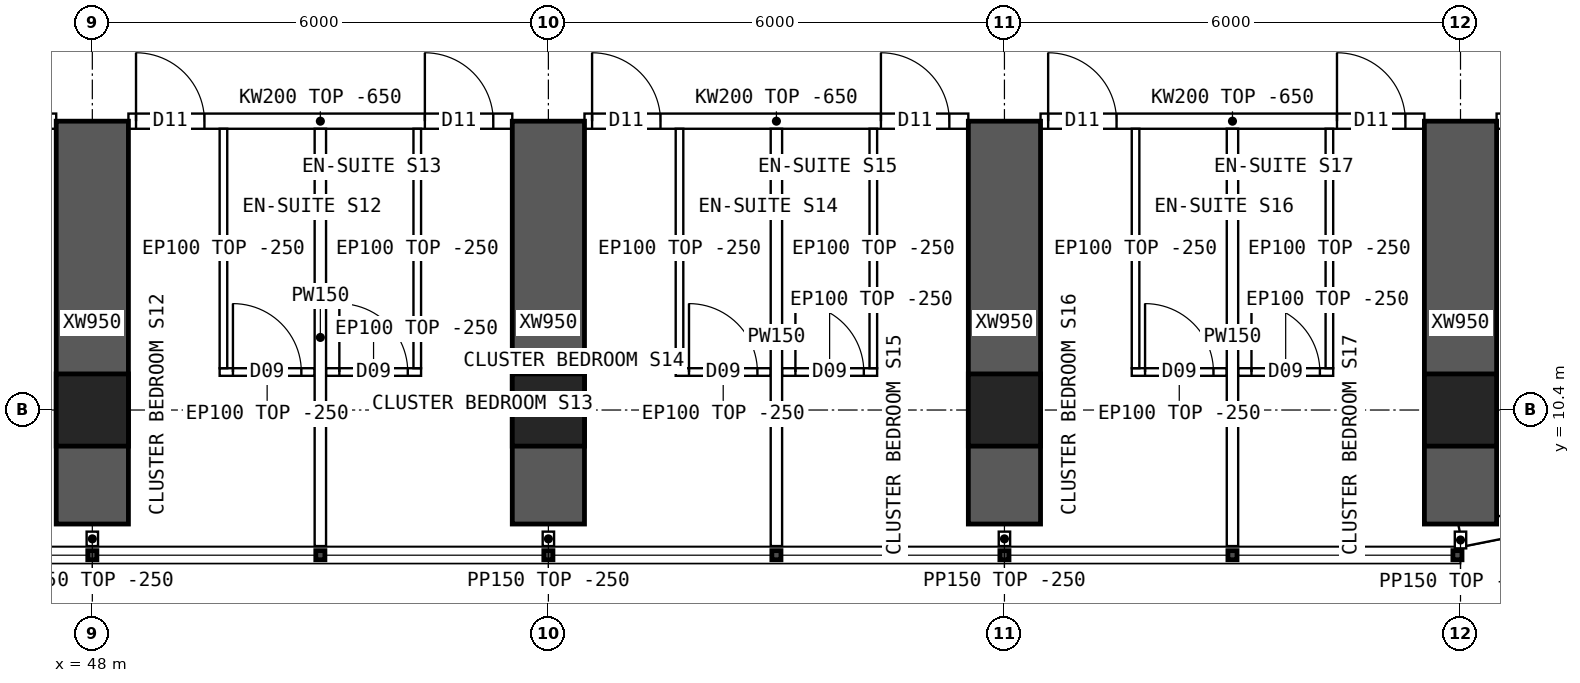
"""IFC4 building model, lengths in metres.
Left out: names, types, materials, properties, quantities, classifications, styles, units other than length and angle.
Written with IfcOpenShell. Run it as: python <this file> out.ifc"""

import sys

from ifc_helpers import new_model, si_unit, direction, frame, frame_2d, origin, origin_2d, place, context, subcontext, project, spatial, polyline, rectangle, hollow_rectangle, outline, extrude, element, fill, save


model = new_model("IFC4")
c1 = context("Model", 3, precision=1e-05, world=origin(), true_north=direction((0.0, 1.0)))
c2 = subcontext(c1, "Body", "Model", "MODEL_VIEW")
j1 = project(units=[si_unit("LENGTHUNIT", "METRE"), si_unit("PLANEANGLEUNIT", "RADIAN")], contexts=[c1])
p1 = place(None, origin())
s1 = spatial("IfcSite", under=j1, at=p1, CompositionType="ELEMENT")
p2 = place(p1, origin())
s2 = spatial("IfcBuilding", under=s1, at=p2, CompositionType="ELEMENT")
p3 = place(p2, frame((0.0, 0.0, 121.9)))
s3 = spatial("IfcBuildingStorey", under=s2, at=p3, CompositionType="ELEMENT", Elevation=121.9)
for number, where, z_axis, x_axis in (
    (1, (48.0, 10.4, 0.0), (0.0, 0.0, 1.0), (1.0, 0.0, 0.0)),
    (2, (54.0, 10.4, 0.0), (0.0, 0.0, 1.0), (1.0, 0.0, 0.0)),
    (3, (60.0, 10.4, 0.0), (0.0, 0.0, 1.0), (1.0, 0.0, 0.0)),
    (4, (66.0, 10.4, 0.0), (0.0, 0.0, 1.0), (1.0, 0.0, 0.0)),
):
    element("IfcColumn", number, at=place(p3, frame(where, z_axis=z_axis, x_axis=x_axis)), inside=s3, PredefinedType="COLUMN", context=c2, shape_type="SweptSolid", body=[
        extrude(hollow_rectangle(XDim=0.95, YDim=0.95, WallThickness=0.095, at=origin_2d()), origin(), (0.0, 0.0, 1.0), 3.75),
    ])
for number, where, z_axis, x_axis in (
    (5, (48.0, 8.9, 0.0), (0.0, 0.0, 1.0), (0.0, 1.0, 0.0)),
    (6, (54.0, 8.9, 0.0), (0.0, 0.0, 1.0), (0.0, 1.0, 0.0)),
    (7, (60.0, 8.9, 0.0), (0.0, 0.0, 1.0), (0.0, 1.0, 0.0)),
    (8, (66.0, 8.9, 0.0), (0.0, 0.0, 1.0), (0.0, 1.0, 0.0)),
):
    element("IfcWall", number, at=place(p3, frame(where, z_axis=z_axis, x_axis=x_axis)), inside=s3, PredefinedType="SHEAR", context=c2, shape_type="SweptSolid", body=[
        extrude(rectangle(XDim=5.3, YDim=0.95, at=frame_2d((2.65, 0.0))), origin(), (0.0, 0.0, 1.0), 3.75),
    ])
p4 = place(p3, frame((66.0, 8.75, 0.0), z_axis=(0.0, 0.0, 1.0), x_axis=(0.980791473772, 0.195059183267, 0.0)))
e9 = element("IfcWall", 9, at=p4, inside=s3, PredefinedType="SOLIDWALL", context=c2, shape_type="SweptSolid", body=[
    extrude(outline(polyline([(-0.03, -0.15), (3.717, -0.15), (3.657, 0.15), (0.03, 0.15), (-0.03, -0.15)])), origin(), (0.0, 0.0, 1.0), 3.5),
])
p5 = place(p4, frame((1.144, 0.0, 0.9)))
e10 = element("IfcOpeningElement", 10, at=p5, cuts=e9, PredefinedType="OPENING", context=c2, shape_type="SweptSolid", body=[
    extrude(rectangle(XDim=1.4, YDim=1.8, at=frame_2d((0.7, 0.9))), frame((0.0, 0.16, 0.0), z_axis=(0.0, -1.0, 0.0), x_axis=(1.0, 0.0, 0.0)), (0.0, 0.0, 1.0), 0.32),
])
p6 = place(p3, frame((42.475, 14.2, 0.0), z_axis=(0.0, 0.0, 1.0), x_axis=(1.0, 0.0, 0.0)))
e11 = element("IfcWall", 11, at=p6, inside=s3, PredefinedType="SOLIDWALL", context=c2, shape_type="SweptSolid", body=[
    extrude(outline(polyline([(0.0, 0.0), (5.05, 0.0), (5.05, 3.1), (0.0, 3.1), (0.0, 0.0)])), frame((0.0, 0.1, 0.0), z_axis=(0.0, -1.0, 0.0), x_axis=(1.0, 0.0, 0.0)), (0.0, 0.0, 1.0), 0.2),
])
p7 = place(p6, frame((0.6, 0.0, 0.0)))
e12 = element("IfcOpeningElement", 12, at=p7, cuts=e11, PredefinedType="OPENING", context=c2, shape_type="SweptSolid", body=[
    extrude(rectangle(XDim=1.0, YDim=2.1, at=frame_2d((0.5, 1.05))), frame((0.0, 0.11, 0.0), z_axis=(0.0, -1.0, 0.0), x_axis=(1.0, 0.0, 0.0)), (0.0, 0.0, 1.0), 0.22),
])
p8 = place(p3, frame((48.475, 14.2, 0.0), z_axis=(0.0, 0.0, 1.0), x_axis=(1.0, 0.0, 0.0)))
e13 = element("IfcWall", 13, at=p8, inside=s3, PredefinedType="SOLIDWALL", context=c2, shape_type="SweptSolid", body=[
    extrude(outline(polyline([(0.0, 0.0), (5.05, 0.0), (5.05, 3.1), (0.0, 3.1), (0.0, 0.0)])), frame((0.0, 0.1, 0.0), z_axis=(0.0, -1.0, 0.0), x_axis=(1.0, 0.0, 0.0)), (0.0, 0.0, 1.0), 0.2),
])
p9 = place(p8, frame((0.1, 0.0, 0.0)))
e14 = element("IfcOpeningElement", 14, at=p9, cuts=e13, PredefinedType="OPENING", context=c2, shape_type="SweptSolid", body=[
    extrude(rectangle(XDim=0.9, YDim=2.1, at=frame_2d((0.45, 1.05))), frame((0.0, 0.11, 0.0), z_axis=(0.0, -1.0, 0.0), x_axis=(1.0, 0.0, 0.0)), (0.0, 0.0, 1.0), 0.22),
])
p10 = place(p8, frame((3.9, 0.0, 0.0)))
e15 = element("IfcOpeningElement", 15, at=p10, cuts=e13, PredefinedType="OPENING", context=c2, shape_type="SweptSolid", body=[
    extrude(rectangle(XDim=0.9, YDim=2.1, at=frame_2d((0.45, 1.05))), frame((0.0, 0.11, 0.0), z_axis=(0.0, -1.0, 0.0), x_axis=(1.0, 0.0, 0.0)), (0.0, 0.0, 1.0), 0.22),
])
p11 = place(p3, frame((54.475, 14.2, 0.0), z_axis=(0.0, 0.0, 1.0), x_axis=(1.0, 0.0, 0.0)))
e16 = element("IfcWall", 16, at=p11, inside=s3, PredefinedType="SOLIDWALL", context=c2, shape_type="SweptSolid", body=[
    extrude(outline(polyline([(0.0, 0.0), (5.05, 0.0), (5.05, 3.1), (0.0, 3.1), (0.0, 0.0)])), frame((0.0, 0.1, 0.0), z_axis=(0.0, -1.0, 0.0), x_axis=(1.0, 0.0, 0.0)), (0.0, 0.0, 1.0), 0.2),
])
p12 = place(p11, frame((0.1, 0.0, 0.0)))
e17 = element("IfcOpeningElement", 17, at=p12, cuts=e16, PredefinedType="OPENING", context=c2, shape_type="SweptSolid", body=[
    extrude(rectangle(XDim=0.9, YDim=2.1, at=frame_2d((0.45, 1.05))), frame((0.0, 0.11, 0.0), z_axis=(0.0, -1.0, 0.0), x_axis=(1.0, 0.0, 0.0)), (0.0, 0.0, 1.0), 0.22),
])
p13 = place(p11, frame((3.9, 0.0, 0.0)))
e18 = element("IfcOpeningElement", 18, at=p13, cuts=e16, PredefinedType="OPENING", context=c2, shape_type="SweptSolid", body=[
    extrude(rectangle(XDim=0.9, YDim=2.1, at=frame_2d((0.45, 1.05))), frame((0.0, 0.11, 0.0), z_axis=(0.0, -1.0, 0.0), x_axis=(1.0, 0.0, 0.0)), (0.0, 0.0, 1.0), 0.22),
])
p14 = place(p3, frame((60.475, 14.2, 0.0), z_axis=(0.0, 0.0, 1.0), x_axis=(1.0, 0.0, 0.0)))
e19 = element("IfcWall", 19, at=p14, inside=s3, PredefinedType="SOLIDWALL", context=c2, shape_type="SweptSolid", body=[
    extrude(outline(polyline([(0.0, 0.0), (5.05, 0.0), (5.05, 3.1), (0.0, 3.1), (0.0, 0.0)])), frame((0.0, 0.1, 0.0), z_axis=(0.0, -1.0, 0.0), x_axis=(1.0, 0.0, 0.0)), (0.0, 0.0, 1.0), 0.2),
])
p15 = place(p14, frame((0.1, 0.0, 0.0)))
e20 = element("IfcOpeningElement", 20, at=p15, cuts=e19, PredefinedType="OPENING", context=c2, shape_type="SweptSolid", body=[
    extrude(rectangle(XDim=0.9, YDim=2.1, at=frame_2d((0.45, 1.05))), frame((0.0, 0.11, 0.0), z_axis=(0.0, -1.0, 0.0), x_axis=(1.0, 0.0, 0.0)), (0.0, 0.0, 1.0), 0.22),
])
p16 = place(p14, frame((3.9, 0.0, 0.0)))
e21 = element("IfcOpeningElement", 21, at=p16, cuts=e19, PredefinedType="OPENING", context=c2, shape_type="SweptSolid", body=[
    extrude(rectangle(XDim=0.9, YDim=2.1, at=frame_2d((0.45, 1.05))), frame((0.0, 0.11, 0.0), z_axis=(0.0, -1.0, 0.0), x_axis=(1.0, 0.0, 0.0)), (0.0, 0.0, 1.0), 0.22),
])
p17 = place(p3, frame((66.475, 14.2, 0.0), z_axis=(0.0, 0.0, 1.0), x_axis=(1.0, 0.0, 0.0)))
e22 = element("IfcWall", 22, at=p17, inside=s3, PredefinedType="SOLIDWALL", context=c2, shape_type="SweptSolid", body=[
    extrude(rectangle(XDim=1.925, YDim=0.2, at=frame_2d((0.962, 0.0))), origin(), (0.0, 0.0, 1.0), 3.5),
])
p18 = place(p17, frame((0.2, 0.0, 0.0)))
e23 = element("IfcOpeningElement", 23, at=p18, cuts=e22, PredefinedType="OPENING", context=c2, shape_type="SweptSolid", body=[
    extrude(rectangle(XDim=0.9, YDim=2.1, at=frame_2d((0.45, 1.05))), frame((0.0, 0.11, 0.0), z_axis=(0.0, -1.0, 0.0), x_axis=(1.0, 0.0, 0.0)), (0.0, 0.0, 1.0), 0.22),
])
p19 = place(p3, frame((51.0, 8.61, 0.0), z_axis=(0.0, 0.0, 1.0), x_axis=(0.0, 1.0, 0.0)))
e24 = element("IfcWall", 24, at=p19, inside=s3, PredefinedType="PARTITIONING", context=c2, shape_type="SweptSolid", body=[
    extrude(outline(polyline([(0.0, 0.0), (5.49, 0.0), (5.49, 3.1), (5.442, 3.1), (5.44, 3.5), (1.992, 3.5), (1.99, 3.1), (1.592, 3.1), (1.59, 3.5), (0.0, 3.5), (0.0, 0.0)])), frame((0.0, 0.075, 0.0), z_axis=(0.0, -1.0, 0.0), x_axis=(1.0, 0.0, 0.0)), (0.0, 0.0, 1.0), 0.15),
])
p20 = place(p3, frame((50.925, 10.9, 0.0), z_axis=(0.0, 0.0, 1.0), x_axis=(-1.0, 0.0, 0.0)))
e25 = element("IfcWall", 25, at=p20, inside=s3, PredefinedType="PARTITIONING", context=c2, shape_type="SweptSolid", body=[
    extrude(rectangle(XDim=1.25, YDim=0.1, at=frame_2d((0.625, 0.0))), origin(), (0.0, 0.0, 1.0), 3.5),
])
p21 = place(p20, frame((0.175, 0.0, 0.0)))
e26 = element("IfcOpeningElement", 26, at=p21, cuts=e25, PredefinedType="OPENING", context=c2, shape_type="SweptSolid", body=[
    extrude(rectangle(XDim=0.9, YDim=2.1, at=frame_2d((0.45, 1.05))), frame((0.0, 0.06, 0.0), z_axis=(0.0, -1.0, 0.0), x_axis=(1.0, 0.0, 0.0)), (0.0, 0.0, 1.0), 0.12),
])
p22 = place(p3, frame((49.725, 10.95, 0.0), z_axis=(0.0, 0.0, 1.0), x_axis=(0.0, 1.0, 0.0)))
e27 = element("IfcWall", 27, at=p22, inside=s3, PredefinedType="PARTITIONING", context=c2, shape_type="SweptSolid", body=[
    extrude(outline(polyline([(0.0, 0.0), (3.15, 0.0), (3.15, 3.1), (3.102, 3.1), (3.1, 3.5), (0.0, 3.5), (0.0, 0.0)])), frame((0.0, 0.05, 0.0), z_axis=(0.0, -1.0, 0.0), x_axis=(1.0, 0.0, 0.0)), (0.0, 0.0, 1.0), 0.1),
])
p23 = place(p3, frame((52.325, 10.9, 0.0), z_axis=(0.0, 0.0, 1.0), x_axis=(-1.0, 0.0, 0.0)))
e28 = element("IfcWall", 28, at=p23, inside=s3, PredefinedType="PARTITIONING", context=c2, shape_type="SweptSolid", body=[
    extrude(rectangle(XDim=1.25, YDim=0.1, at=frame_2d((0.625, 0.0))), origin(), (0.0, 0.0, 1.0), 3.5),
])
p24 = place(p23, frame((0.175, 0.0, 0.0)))
e29 = element("IfcOpeningElement", 29, at=p24, cuts=e28, PredefinedType="OPENING", context=c2, shape_type="SweptSolid", body=[
    extrude(rectangle(XDim=0.9, YDim=2.1, at=frame_2d((0.45, 1.05))), frame((0.0, 0.06, 0.0), z_axis=(0.0, -1.0, 0.0), x_axis=(1.0, 0.0, 0.0)), (0.0, 0.0, 1.0), 0.12),
])
p25 = place(p3, frame((52.275, 10.95, 0.0), z_axis=(0.0, 0.0, 1.0), x_axis=(0.0, 1.0, 0.0)))
e30 = element("IfcWall", 30, at=p25, inside=s3, PredefinedType="PARTITIONING", context=c2, shape_type="SweptSolid", body=[
    extrude(outline(polyline([(0.0, 0.0), (3.15, 0.0), (3.15, 3.1), (3.102, 3.1), (3.1, 3.5), (0.0, 3.5), (0.0, 0.0)])), frame((0.0, 0.05, 0.0), z_axis=(0.0, -1.0, 0.0), x_axis=(1.0, 0.0, 0.0)), (0.0, 0.0, 1.0), 0.1),
])
p26 = place(p3, frame((57.0, 8.61, 0.0), z_axis=(0.0, 0.0, 1.0), x_axis=(0.0, 1.0, 0.0)))
e31 = element("IfcWall", 31, at=p26, inside=s3, PredefinedType="PARTITIONING", context=c2, shape_type="SweptSolid", body=[
    extrude(outline(polyline([(0.0, 0.0), (5.49, 0.0), (5.49, 3.1), (5.442, 3.1), (5.44, 3.5), (1.992, 3.5), (1.99, 3.1), (1.592, 3.1), (1.59, 3.5), (0.0, 3.5), (0.0, 0.0)])), frame((0.0, 0.075, 0.0), z_axis=(0.0, -1.0, 0.0), x_axis=(1.0, 0.0, 0.0)), (0.0, 0.0, 1.0), 0.15),
])
p27 = place(p3, frame((56.925, 10.9, 0.0), z_axis=(0.0, 0.0, 1.0), x_axis=(-1.0, 0.0, 0.0)))
e32 = element("IfcWall", 32, at=p27, inside=s3, PredefinedType="PARTITIONING", context=c2, shape_type="SweptSolid", body=[
    extrude(rectangle(XDim=1.25, YDim=0.1, at=frame_2d((0.625, 0.0))), origin(), (0.0, 0.0, 1.0), 3.5),
])
p28 = place(p27, frame((0.175, 0.0, 0.0)))
e33 = element("IfcOpeningElement", 33, at=p28, cuts=e32, PredefinedType="OPENING", context=c2, shape_type="SweptSolid", body=[
    extrude(rectangle(XDim=0.9, YDim=2.1, at=frame_2d((0.45, 1.05))), frame((0.0, 0.06, 0.0), z_axis=(0.0, -1.0, 0.0), x_axis=(1.0, 0.0, 0.0)), (0.0, 0.0, 1.0), 0.12),
])
p29 = place(p3, frame((55.725, 10.95, 0.0), z_axis=(0.0, 0.0, 1.0), x_axis=(0.0, 1.0, 0.0)))
e34 = element("IfcWall", 34, at=p29, inside=s3, PredefinedType="PARTITIONING", context=c2, shape_type="SweptSolid", body=[
    extrude(outline(polyline([(0.0, 0.0), (3.15, 0.0), (3.15, 3.1), (3.102, 3.1), (3.1, 3.5), (0.0, 3.5), (0.0, 0.0)])), frame((0.0, 0.05, 0.0), z_axis=(0.0, -1.0, 0.0), x_axis=(1.0, 0.0, 0.0)), (0.0, 0.0, 1.0), 0.1),
])
p30 = place(p3, frame((58.325, 10.9, 0.0), z_axis=(0.0, 0.0, 1.0), x_axis=(-1.0, 0.0, 0.0)))
e35 = element("IfcWall", 35, at=p30, inside=s3, PredefinedType="PARTITIONING", context=c2, shape_type="SweptSolid", body=[
    extrude(rectangle(XDim=1.25, YDim=0.1, at=frame_2d((0.625, 0.0))), origin(), (0.0, 0.0, 1.0), 3.5),
])
p31 = place(p30, frame((0.175, 0.0, 0.0)))
e36 = element("IfcOpeningElement", 36, at=p31, cuts=e35, PredefinedType="OPENING", context=c2, shape_type="SweptSolid", body=[
    extrude(rectangle(XDim=0.9, YDim=2.1, at=frame_2d((0.45, 1.05))), frame((0.0, 0.06, 0.0), z_axis=(0.0, -1.0, 0.0), x_axis=(1.0, 0.0, 0.0)), (0.0, 0.0, 1.0), 0.12),
])
p32 = place(p3, frame((58.275, 10.95, 0.0), z_axis=(0.0, 0.0, 1.0), x_axis=(0.0, 1.0, 0.0)))
e37 = element("IfcWall", 37, at=p32, inside=s3, PredefinedType="PARTITIONING", context=c2, shape_type="SweptSolid", body=[
    extrude(outline(polyline([(0.0, 0.0), (3.15, 0.0), (3.15, 3.1), (3.102, 3.1), (3.1, 3.5), (0.0, 3.5), (0.0, 0.0)])), frame((0.0, 0.05, 0.0), z_axis=(0.0, -1.0, 0.0), x_axis=(1.0, 0.0, 0.0)), (0.0, 0.0, 1.0), 0.1),
])
p33 = place(p3, frame((63.0, 8.61, 0.0), z_axis=(0.0, 0.0, 1.0), x_axis=(0.0, 1.0, 0.0)))
e38 = element("IfcWall", 38, at=p33, inside=s3, PredefinedType="PARTITIONING", context=c2, shape_type="SweptSolid", body=[
    extrude(outline(polyline([(0.0, 0.0), (5.49, 0.0), (5.49, 3.1), (5.442, 3.1), (5.44, 3.5), (1.992, 3.5), (1.99, 3.1), (1.592, 3.1), (1.59, 3.5), (0.0, 3.5), (0.0, 0.0)])), frame((0.0, 0.075, 0.0), z_axis=(0.0, -1.0, 0.0), x_axis=(1.0, 0.0, 0.0)), (0.0, 0.0, 1.0), 0.15),
])
p34 = place(p3, frame((62.925, 10.9, 0.0), z_axis=(0.0, 0.0, 1.0), x_axis=(-1.0, 0.0, 0.0)))
e39 = element("IfcWall", 39, at=p34, inside=s3, PredefinedType="PARTITIONING", context=c2, shape_type="SweptSolid", body=[
    extrude(rectangle(XDim=1.25, YDim=0.1, at=frame_2d((0.625, 0.0))), origin(), (0.0, 0.0, 1.0), 3.5),
])
p35 = place(p34, frame((0.175, 0.0, 0.0)))
e40 = element("IfcOpeningElement", 40, at=p35, cuts=e39, PredefinedType="OPENING", context=c2, shape_type="SweptSolid", body=[
    extrude(rectangle(XDim=0.9, YDim=2.1, at=frame_2d((0.45, 1.05))), frame((0.0, 0.06, 0.0), z_axis=(0.0, -1.0, 0.0), x_axis=(1.0, 0.0, 0.0)), (0.0, 0.0, 1.0), 0.12),
])
p36 = place(p3, frame((61.725, 10.95, 0.0), z_axis=(0.0, 0.0, 1.0), x_axis=(0.0, 1.0, 0.0)))
e41 = element("IfcWall", 41, at=p36, inside=s3, PredefinedType="PARTITIONING", context=c2, shape_type="SweptSolid", body=[
    extrude(outline(polyline([(0.0, 0.0), (3.15, 0.0), (3.15, 3.1), (3.102, 3.1), (3.1, 3.5), (0.0, 3.5), (0.0, 0.0)])), frame((0.0, 0.05, 0.0), z_axis=(0.0, -1.0, 0.0), x_axis=(1.0, 0.0, 0.0)), (0.0, 0.0, 1.0), 0.1),
])
p37 = place(p3, frame((64.325, 10.9, 0.0), z_axis=(0.0, 0.0, 1.0), x_axis=(-1.0, 0.0, 0.0)))
e42 = element("IfcWall", 42, at=p37, inside=s3, PredefinedType="PARTITIONING", context=c2, shape_type="SweptSolid", body=[
    extrude(rectangle(XDim=1.25, YDim=0.1, at=frame_2d((0.625, 0.0))), origin(), (0.0, 0.0, 1.0), 3.5),
])
p38 = place(p37, frame((0.175, 0.0, 0.0)))
e43 = element("IfcOpeningElement", 43, at=p38, cuts=e42, PredefinedType="OPENING", context=c2, shape_type="SweptSolid", body=[
    extrude(rectangle(XDim=0.9, YDim=2.1, at=frame_2d((0.45, 1.05))), frame((0.0, 0.06, 0.0), z_axis=(0.0, -1.0, 0.0), x_axis=(1.0, 0.0, 0.0)), (0.0, 0.0, 1.0), 0.12),
])
p39 = place(p3, frame((64.275, 10.95, 0.0), z_axis=(0.0, 0.0, 1.0), x_axis=(0.0, 1.0, 0.0)))
e44 = element("IfcWall", 44, at=p39, inside=s3, PredefinedType="PARTITIONING", context=c2, shape_type="SweptSolid", body=[
    extrude(outline(polyline([(0.0, 0.0), (3.15, 0.0), (3.15, 3.1), (3.102, 3.1), (3.1, 3.5), (0.0, 3.5), (0.0, 0.0)])), frame((0.0, 0.05, 0.0), z_axis=(0.0, -1.0, 0.0), x_axis=(1.0, 0.0, 0.0)), (0.0, 0.0, 1.0), 0.1),
])
for number, where, z_axis, x_axis in (
    (45, (48.0, 8.8, 0.0), (0.0, 0.0, 1.0), (0.0, -1.0, 0.0)),
    (46, (54.0, 8.8, 0.0), (0.0, 0.0, 1.0), (0.0, -1.0, 0.0)),
    (47, (60.0, 8.8, 0.0), (0.0, 0.0, 1.0), (0.0, -1.0, 0.0)),
):
    element("IfcWall", number, at=place(p3, frame(where, z_axis=z_axis, x_axis=x_axis)), inside=s3, PredefinedType="PARTITIONING", context=c2, shape_type="SweptSolid", body=[
        extrude(rectangle(XDim=0.19, YDim=0.15, at=frame_2d((0.095, 0.0))), origin(), (0.0, 0.0, 1.0), 3.5),
    ])
p40 = place(p3, frame((66.0, 8.8, 0.0), z_axis=(0.0, 0.0, 1.0), x_axis=(0.0, -1.0, 0.0)))
e48 = element("IfcWall", 48, at=p40, inside=s3, PredefinedType="PARTITIONING", context=c2, shape_type="SweptSolid", body=[
    extrude(rectangle(XDim=0.22, YDim=0.15, at=frame_2d((0.11, 0.0))), origin(), (0.0, 0.0, 1.0), 3.5),
])
p41 = place(p21, origin())
e49 = element("IfcDoor", 49, at=p41, inside=s3, OperationType="SINGLE_SWING_RIGHT", PredefinedType="DOOR", context=c2, shape_type="SweptSolid", body=[
    extrude(rectangle(XDim=0.9, YDim=2.1, at=frame_2d((0.45, 1.05))), frame((0.0, 0.025, 0.0), z_axis=(0.0, -1.0, 0.0), x_axis=(1.0, 0.0, 0.0)), (0.0, 0.0, 1.0), 0.05),
])
fill(e26, e49)
p42 = place(p9, origin())
e50 = element("IfcDoor", 50, at=p42, inside=s3, OperationType="SINGLE_SWING_LEFT", PredefinedType="DOOR", context=c2, shape_type="SweptSolid", body=[
    extrude(rectangle(XDim=0.9, YDim=2.1, at=frame_2d((0.45, 1.05))), frame((0.0, 0.025, 0.0), z_axis=(0.0, -1.0, 0.0), x_axis=(1.0, 0.0, 0.0)), (0.0, 0.0, 1.0), 0.05),
])
fill(e14, e50)
p43 = place(p24, origin())
e51 = element("IfcDoor", 51, at=p43, inside=s3, OperationType="SINGLE_SWING_RIGHT", PredefinedType="DOOR", context=c2, shape_type="SweptSolid", body=[
    extrude(rectangle(XDim=0.9, YDim=2.1, at=frame_2d((0.45, 1.05))), frame((0.0, 0.025, 0.0), z_axis=(0.0, -1.0, 0.0), x_axis=(1.0, 0.0, 0.0)), (0.0, 0.0, 1.0), 0.05),
])
fill(e29, e51)
p44 = place(p10, origin())
e52 = element("IfcDoor", 52, at=p44, inside=s3, OperationType="SINGLE_SWING_LEFT", PredefinedType="DOOR", context=c2, shape_type="SweptSolid", body=[
    extrude(rectangle(XDim=0.9, YDim=2.1, at=frame_2d((0.45, 1.05))), frame((0.0, 0.025, 0.0), z_axis=(0.0, -1.0, 0.0), x_axis=(1.0, 0.0, 0.0)), (0.0, 0.0, 1.0), 0.05),
])
fill(e15, e52)
p45 = place(p28, origin())
e53 = element("IfcDoor", 53, at=p45, inside=s3, OperationType="SINGLE_SWING_RIGHT", PredefinedType="DOOR", context=c2, shape_type="SweptSolid", body=[
    extrude(rectangle(XDim=0.9, YDim=2.1, at=frame_2d((0.45, 1.05))), frame((0.0, 0.025, 0.0), z_axis=(0.0, -1.0, 0.0), x_axis=(1.0, 0.0, 0.0)), (0.0, 0.0, 1.0), 0.05),
])
fill(e33, e53)
p46 = place(p12, origin())
e54 = element("IfcDoor", 54, at=p46, inside=s3, OperationType="SINGLE_SWING_LEFT", PredefinedType="DOOR", context=c2, shape_type="SweptSolid", body=[
    extrude(rectangle(XDim=0.9, YDim=2.1, at=frame_2d((0.45, 1.05))), frame((0.0, 0.025, 0.0), z_axis=(0.0, -1.0, 0.0), x_axis=(1.0, 0.0, 0.0)), (0.0, 0.0, 1.0), 0.05),
])
fill(e17, e54)
p47 = place(p31, origin())
e55 = element("IfcDoor", 55, at=p47, inside=s3, OperationType="SINGLE_SWING_RIGHT", PredefinedType="DOOR", context=c2, shape_type="SweptSolid", body=[
    extrude(rectangle(XDim=0.9, YDim=2.1, at=frame_2d((0.45, 1.05))), frame((0.0, 0.025, 0.0), z_axis=(0.0, -1.0, 0.0), x_axis=(1.0, 0.0, 0.0)), (0.0, 0.0, 1.0), 0.05),
])
fill(e36, e55)
p48 = place(p13, origin())
e56 = element("IfcDoor", 56, at=p48, inside=s3, OperationType="SINGLE_SWING_LEFT", PredefinedType="DOOR", context=c2, shape_type="SweptSolid", body=[
    extrude(rectangle(XDim=0.9, YDim=2.1, at=frame_2d((0.45, 1.05))), frame((0.0, 0.025, 0.0), z_axis=(0.0, -1.0, 0.0), x_axis=(1.0, 0.0, 0.0)), (0.0, 0.0, 1.0), 0.05),
])
fill(e18, e56)
p49 = place(p35, origin())
e57 = element("IfcDoor", 57, at=p49, inside=s3, OperationType="SINGLE_SWING_RIGHT", PredefinedType="DOOR", context=c2, shape_type="SweptSolid", body=[
    extrude(rectangle(XDim=0.9, YDim=2.1, at=frame_2d((0.45, 1.05))), frame((0.0, 0.025, 0.0), z_axis=(0.0, -1.0, 0.0), x_axis=(1.0, 0.0, 0.0)), (0.0, 0.0, 1.0), 0.05),
])
fill(e40, e57)
p50 = place(p15, origin())
e58 = element("IfcDoor", 58, at=p50, inside=s3, OperationType="SINGLE_SWING_LEFT", PredefinedType="DOOR", context=c2, shape_type="SweptSolid", body=[
    extrude(rectangle(XDim=0.9, YDim=2.1, at=frame_2d((0.45, 1.05))), frame((0.0, 0.025, 0.0), z_axis=(0.0, -1.0, 0.0), x_axis=(1.0, 0.0, 0.0)), (0.0, 0.0, 1.0), 0.05),
])
fill(e20, e58)
p51 = place(p38, origin())
e59 = element("IfcDoor", 59, at=p51, inside=s3, OperationType="SINGLE_SWING_RIGHT", PredefinedType="DOOR", context=c2, shape_type="SweptSolid", body=[
    extrude(rectangle(XDim=0.9, YDim=2.1, at=frame_2d((0.45, 1.05))), frame((0.0, 0.025, 0.0), z_axis=(0.0, -1.0, 0.0), x_axis=(1.0, 0.0, 0.0)), (0.0, 0.0, 1.0), 0.05),
])
fill(e43, e59)
p52 = place(p16, origin())
e60 = element("IfcDoor", 60, at=p52, inside=s3, OperationType="SINGLE_SWING_LEFT", PredefinedType="DOOR", context=c2, shape_type="SweptSolid", body=[
    extrude(rectangle(XDim=0.9, YDim=2.1, at=frame_2d((0.45, 1.05))), frame((0.0, 0.025, 0.0), z_axis=(0.0, -1.0, 0.0), x_axis=(1.0, 0.0, 0.0)), (0.0, 0.0, 1.0), 0.05),
])
fill(e21, e60)
save(model, sys.argv[1])
